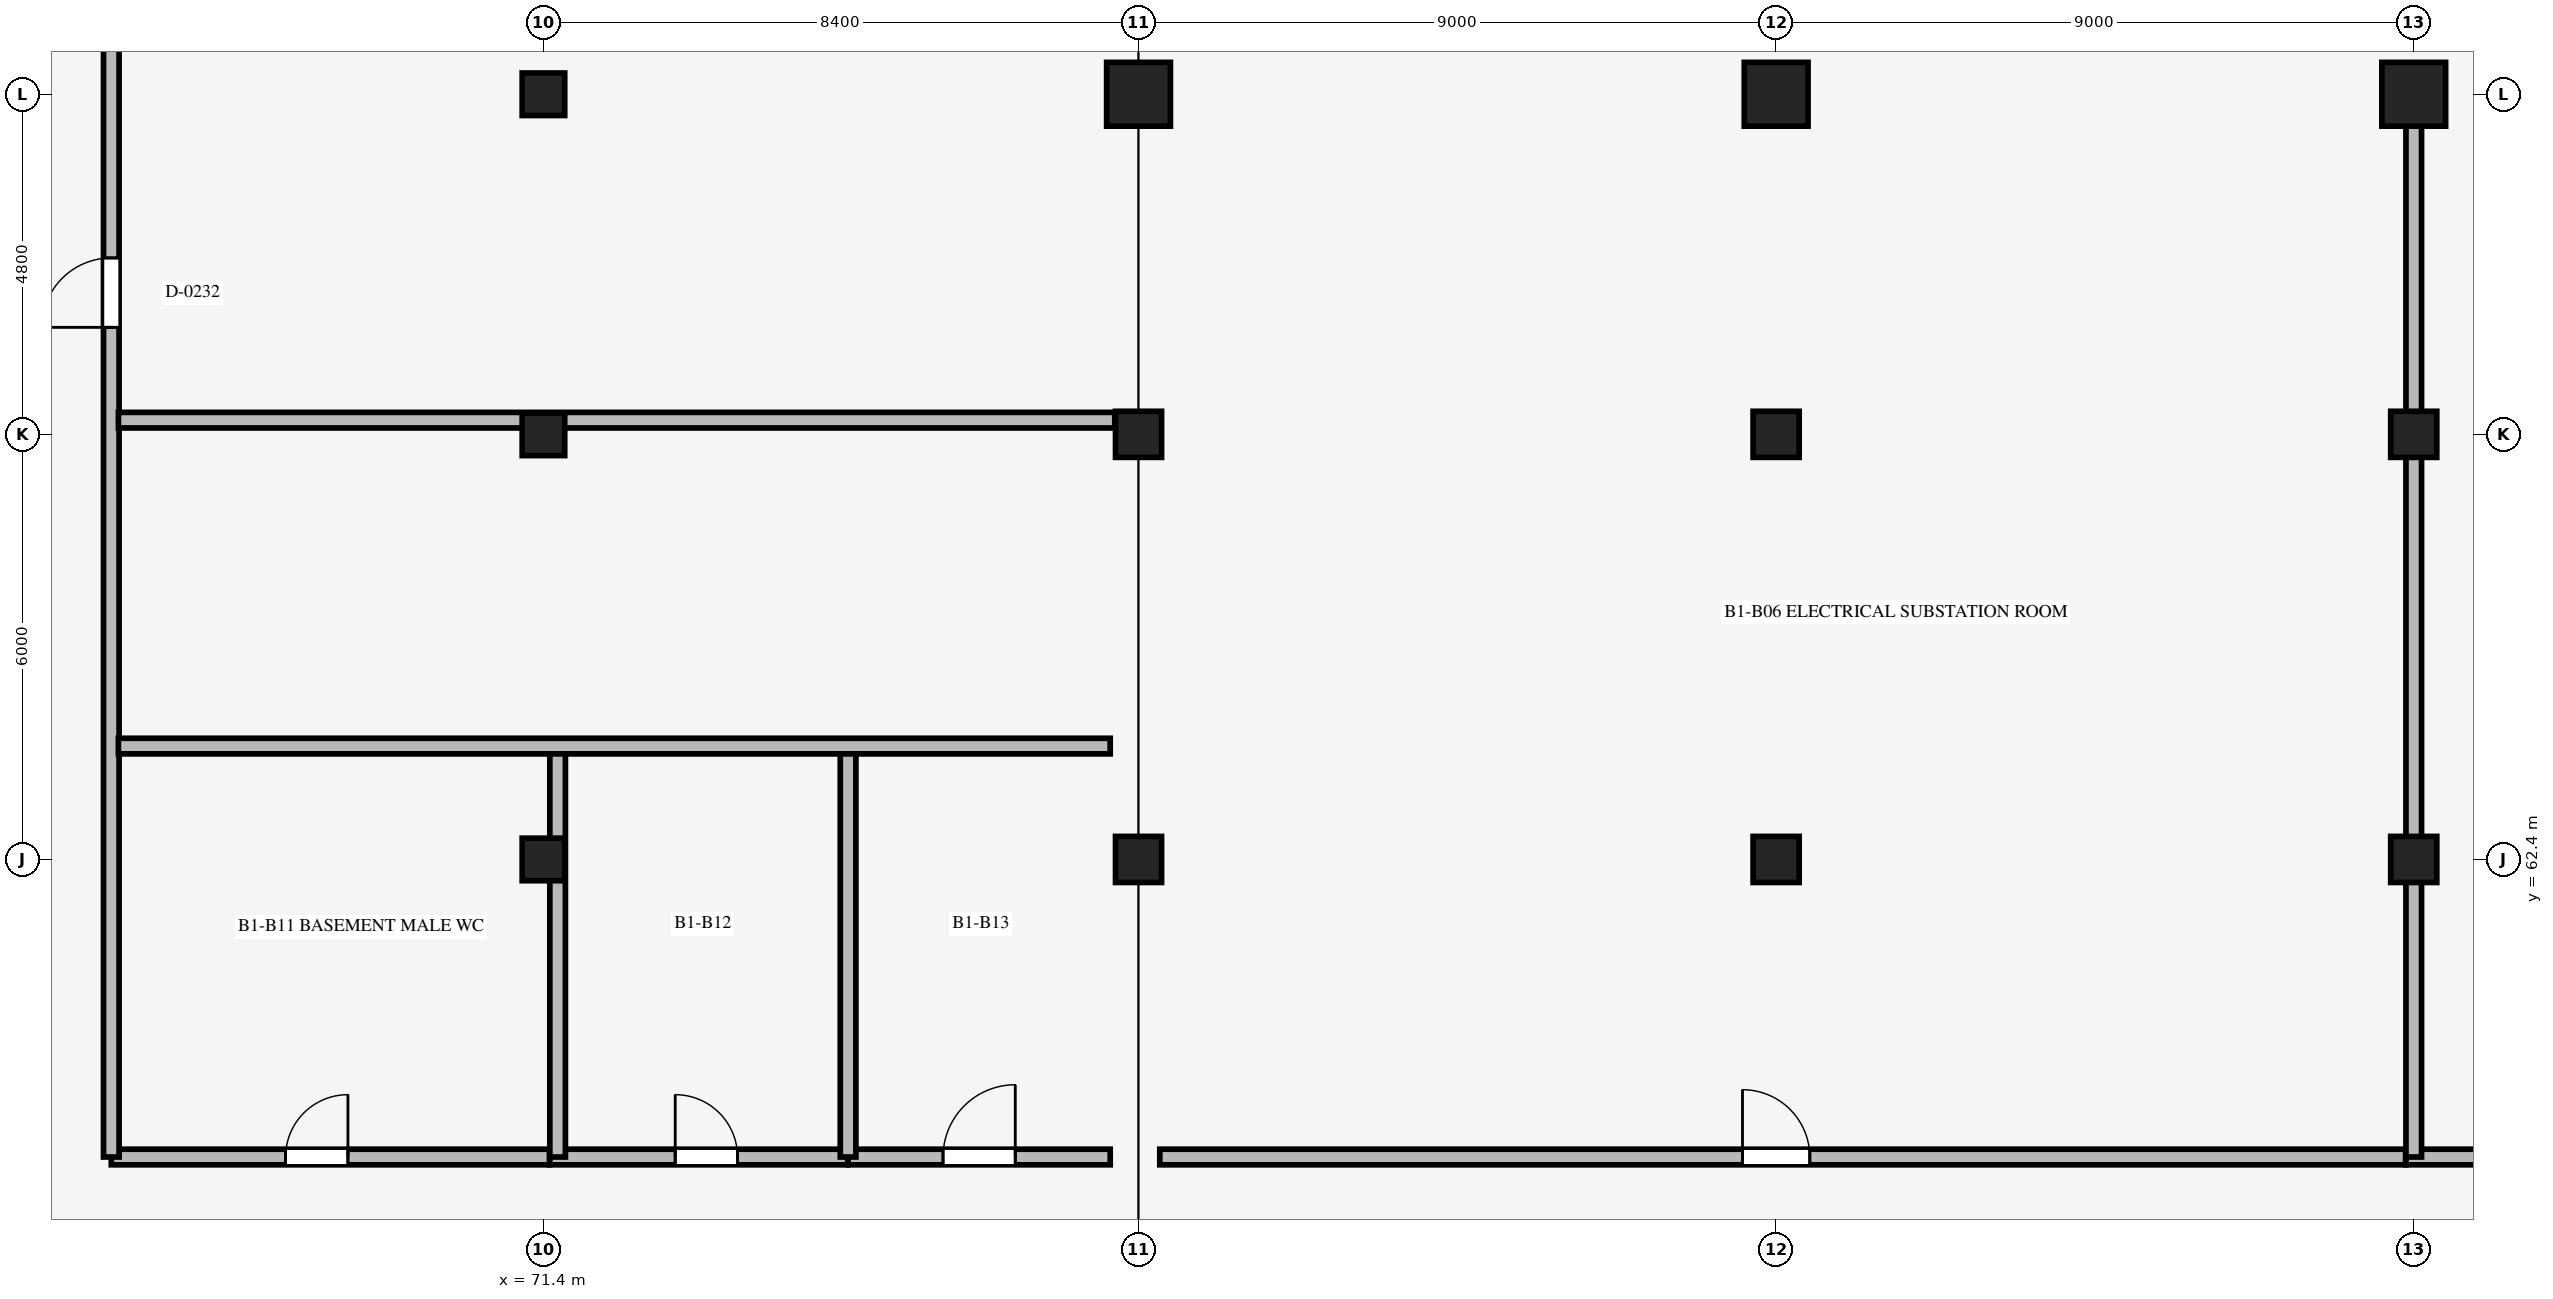
"""IFC4 building model, lengths in metres.
Left out: names, types, materials, properties, quantities, classifications, styles, units other than length and angle.
Written with IfcOpenShell. Run it as: python <this file> out.ifc"""

import sys

from ifc_helpers import new_model, si_unit, direction, frame, frame_2d, origin, origin_2d, place, context, subcontext, project, spatial, rectangle, extrude, element, fill, save


model = new_model("IFC4")
c1 = context("Model", 3, precision=1e-05, world=origin(), true_north=direction((0.0, 1.0)))
c2 = subcontext(c1, "Body", "Model", "MODEL_VIEW")
j1 = project(units=[si_unit("LENGTHUNIT", "METRE"), si_unit("PLANEANGLEUNIT", "RADIAN")], contexts=[c1])
p1 = place(None, origin())
s1 = spatial("IfcSite", under=j1, at=p1, CompositionType="ELEMENT")
p2 = place(p1, origin())
s2 = spatial("IfcBuilding", under=s1, at=p2, CompositionType="ELEMENT")
p3 = place(p2, frame((0.0, 0.0, -4.8)))
s3 = spatial("IfcBuildingStorey", under=s2, at=p3, CompositionType="ELEMENT", Elevation=-4.8)
for number, where, z_axis, x_axis in (
    (1, (71.4, 62.4, 0.0), (0.0, 0.0, 1.0), (1.0, 0.0, 0.0)),
    (2, (71.4, 68.4, 0.0), (0.0, 0.0, 1.0), (1.0, 0.0, 0.0)),
    (3, (71.4, 73.2, 0.0), (0.0, 0.0, 1.0), (1.0, 0.0, 0.0)),
):
    element("IfcColumn", number, at=place(p3, frame(where, z_axis=z_axis, x_axis=x_axis)), inside=s3, PredefinedType="COLUMN", context=c2, shape_type="SweptSolid", body=[
        extrude(rectangle(XDim=0.6, YDim=0.6, at=origin_2d()), origin(), (0.0, 0.0, 1.0), 4.8),
    ])
for number, where, z_axis, x_axis in (
    (4, (79.8, 62.4, 0.0), (0.0, 0.0, 1.0), (1.0, 0.0, 0.0)),
    (5, (79.8, 68.4, 0.0), (0.0, 0.0, 1.0), (1.0, 0.0, 0.0)),
):
    element("IfcColumn", number, at=place(p3, frame(where, z_axis=z_axis, x_axis=x_axis)), inside=s3, PredefinedType="COLUMN", context=c2, shape_type="SweptSolid", body=[
        extrude(rectangle(XDim=0.65, YDim=0.65, at=origin_2d()), origin(), (0.0, 0.0, 1.0), 4.8),
    ])
p4 = place(p3, frame((79.8, 73.2, 0.0), z_axis=(0.0, 0.0, 1.0), x_axis=(1.0, 0.0, 0.0)))
e6 = element("IfcColumn", 6, at=p4, inside=s3, PredefinedType="COLUMN", context=c2, shape_type="SweptSolid", body=[
    extrude(rectangle(XDim=0.9, YDim=0.9, at=origin_2d()), origin(), (0.0, 0.0, 1.0), 4.8),
])
for number, where, z_axis, x_axis in (
    (7, (88.8, 62.4, 0.0), (0.0, 0.0, 1.0), (1.0, 0.0, 0.0)),
    (8, (88.8, 68.4, 0.0), (0.0, 0.0, 1.0), (1.0, 0.0, 0.0)),
):
    element("IfcColumn", number, at=place(p3, frame(where, z_axis=z_axis, x_axis=x_axis)), inside=s3, PredefinedType="COLUMN", context=c2, shape_type="SweptSolid", body=[
        extrude(rectangle(XDim=0.65, YDim=0.65, at=origin_2d()), origin(), (0.0, 0.0, 1.0), 4.8),
    ])
p5 = place(p3, frame((88.8, 73.2, 0.0), z_axis=(0.0, 0.0, 1.0), x_axis=(1.0, 0.0, 0.0)))
e9 = element("IfcColumn", 9, at=p5, inside=s3, PredefinedType="COLUMN", context=c2, shape_type="SweptSolid", body=[
    extrude(rectangle(XDim=0.9, YDim=0.9, at=origin_2d()), origin(), (0.0, 0.0, 1.0), 4.8),
])
for number, where, z_axis, x_axis in (
    (10, (97.8, 62.4, 0.0), (0.0, 0.0, 1.0), (1.0, 0.0, 0.0)),
    (11, (97.8, 68.4, 0.0), (0.0, 0.0, 1.0), (1.0, 0.0, 0.0)),
):
    element("IfcColumn", number, at=place(p3, frame(where, z_axis=z_axis, x_axis=x_axis)), inside=s3, PredefinedType="COLUMN", context=c2, shape_type="SweptSolid", body=[
        extrude(rectangle(XDim=0.65, YDim=0.65, at=origin_2d()), origin(), (0.0, 0.0, 1.0), 4.8),
    ])
p6 = place(p3, frame((97.8, 73.2, 0.0), z_axis=(0.0, 0.0, 1.0), x_axis=(1.0, 0.0, 0.0)))
e12 = element("IfcColumn", 12, at=p6, inside=s3, PredefinedType="COLUMN", context=c2, shape_type="SweptSolid", body=[
    extrude(rectangle(XDim=0.9, YDim=0.9, at=origin_2d()), origin(), (0.0, 0.0, 1.0), 4.8),
])
p7 = place(p3, frame((65.3, 58.2, 0.0), z_axis=(0.0, 0.0, 1.0), x_axis=(1.0, 0.0, 0.0)))
e13 = element("IfcWall", 13, at=p7, inside=s3, PredefinedType="STANDARD", context=c2, shape_type="SweptSolid", body=[
    extrude(rectangle(XDim=6.185, YDim=0.22, at=frame_2d((3.093, 0.0))), origin(), (0.0, 0.0, 1.0), 3.1),
])
p8 = place(p7, frame((2.46, 0.0, 0.0)))
e14 = element("IfcOpeningElement", 14, at=p8, cuts=e13, PredefinedType="OPENING", context=c2, shape_type="SweptSolid", body=[
    extrude(rectangle(XDim=0.88, YDim=2.1, at=frame_2d((0.44, 1.05))), frame((0.0, 0.12, 0.0), z_axis=(0.0, -1.0, 0.0), x_axis=(1.0, 0.0, 0.0)), (0.0, 0.0, 1.0), 0.24),
])
p9 = place(p3, frame((71.49, 58.2, 0.0), z_axis=(0.0, 0.0, 1.0), x_axis=(1.0, 0.0, 0.0)))
e15 = element("IfcWall", 15, at=p9, inside=s3, PredefinedType="STANDARD", context=c2, shape_type="SweptSolid", body=[
    extrude(rectangle(XDim=4.205, YDim=0.22, at=frame_2d((2.103, 0.0))), origin(), (0.0, 0.0, 1.0), 3.1),
])
p10 = place(p9, frame((1.77, 0.0, 0.0)))
e16 = element("IfcOpeningElement", 16, at=p10, cuts=e15, PredefinedType="OPENING", context=c2, shape_type="SweptSolid", body=[
    extrude(rectangle(XDim=0.88, YDim=2.1, at=frame_2d((0.44, 1.05))), frame((0.0, 0.12, 0.0), z_axis=(0.0, -1.0, 0.0), x_axis=(1.0, 0.0, 0.0)), (0.0, 0.0, 1.0), 0.24),
])
p11 = place(p3, frame((75.7, 58.2, 0.0), z_axis=(0.0, 0.0, 1.0), x_axis=(1.0, 0.0, 0.0)))
e17 = element("IfcWall", 17, at=p11, inside=s3, PredefinedType="STANDARD", context=c2, shape_type="SweptSolid", body=[
    extrude(rectangle(XDim=3.7, YDim=0.22, at=frame_2d((1.85, 0.0))), origin(), (0.0, 0.0, 1.0), 3.1),
])
p12 = place(p11, frame((1.34, 0.0, 0.0)))
e18 = element("IfcOpeningElement", 18, at=p12, cuts=e17, PredefinedType="OPENING", context=c2, shape_type="SweptSolid", body=[
    extrude(rectangle(XDim=1.02, YDim=2.15, at=frame_2d((0.51, 1.075))), frame((0.0, 0.12, 0.0), z_axis=(0.0, -1.0, 0.0), x_axis=(1.0, 0.0, 0.0)), (0.0, 0.0, 1.0), 0.24),
])
p13 = place(p3, frame((65.3, 58.2, 0.0), z_axis=(0.0, 0.0, 1.0), x_axis=(0.0, 1.0, 0.0)))
e19 = element("IfcWall", 19, at=p13, inside=s3, PredefinedType="STANDARD", context=c2, shape_type="SweptSolid", body=[
    extrude(rectangle(XDim=21.6, YDim=0.22, at=frame_2d((10.8, 0.0))), origin(), (0.0, 0.0, 1.0), 3.1),
])
p14 = place(p13, frame((11.71, 0.0, 0.0)))
e20 = element("IfcOpeningElement", 20, at=p14, cuts=e19, PredefinedType="OPENING", context=c2, shape_type="SweptSolid", body=[
    extrude(rectangle(XDim=0.98, YDim=2.15, at=frame_2d((0.49, 1.075))), frame((0.0, 0.12, 0.0), z_axis=(0.0, -1.0, 0.0), x_axis=(1.0, 0.0, 0.0)), (0.0, 0.0, 1.0), 0.24),
])
p15 = place(p3, frame((65.4, 68.6, 0.0), z_axis=(0.0, 0.0, 1.0), x_axis=(1.0, 0.0, 0.0)))
e21 = element("IfcWall", 21, at=p15, inside=s3, PredefinedType="STANDARD", context=c2, shape_type="SweptSolid", body=[
    extrude(rectangle(XDim=14.065, YDim=0.22, at=frame_2d((7.033, 0.0))), origin(), (0.0, 0.0, 1.0), 3.1),
])
for number, where, z_axis, x_axis in (
    (22, (71.6, 58.2, 0.0), (0.0, 0.0, 1.0), (0.0, 1.0, 0.0)),
    (23, (75.7, 58.2, 0.0), (0.0, 0.0, 1.0), (0.0, 1.0, 0.0)),
):
    element("IfcWall", number, at=place(p3, frame(where, z_axis=z_axis, x_axis=x_axis)), inside=s3, PredefinedType="STANDARD", context=c2, shape_type="SweptSolid", body=[
        extrude(rectangle(XDim=5.8, YDim=0.22, at=frame_2d((2.9, 0.0))), origin(), (0.0, 0.0, 1.0), 3.1),
    ])
p16 = place(p3, frame((65.4, 64.0, 0.0), z_axis=(0.0, 0.0, 1.0), x_axis=(1.0, 0.0, 0.0)))
e24 = element("IfcWall", 24, at=p16, inside=s3, PredefinedType="STANDARD", context=c2, shape_type="SweptSolid", body=[
    extrude(rectangle(XDim=14.0, YDim=0.22, at=frame_2d((7.0, 0.0))), origin(), (0.0, 0.0, 1.0), 3.1),
])
p17 = place(p3, frame((80.1, 58.2, 0.0), z_axis=(0.0, 0.0, 1.0), x_axis=(1.0, 0.0, 0.0)))
e25 = element("IfcWall", 25, at=p17, inside=s3, PredefinedType="STANDARD", context=c2, shape_type="SweptSolid", body=[
    extrude(rectangle(XDim=17.585, YDim=0.22, at=frame_2d((8.792, 0.0))), origin(), (0.0, 0.0, 1.0), 3.1),
])
p18 = place(p17, frame((8.225, 0.0, 0.0)))
e26 = element("IfcOpeningElement", 26, at=p18, cuts=e25, PredefinedType="OPENING", context=c2, shape_type="SweptSolid", body=[
    extrude(rectangle(XDim=0.95, YDim=2.15, at=frame_2d((0.475, 1.075))), frame((0.0, 0.12, 0.0), z_axis=(0.0, -1.0, 0.0), x_axis=(1.0, 0.0, 0.0)), (0.0, 0.0, 1.0), 0.24),
])
p19 = place(p3, frame((97.69, 58.2, 0.0), z_axis=(0.0, 0.0, 1.0), x_axis=(1.0, 0.0, 0.0)))
e27 = element("IfcWall", 27, at=p19, inside=s3, PredefinedType="STANDARD", context=c2, shape_type="SweptSolid", body=[
    extrude(rectangle(XDim=17.995, YDim=0.22, at=frame_2d((8.998, 0.0))), origin(), (0.0, 0.0, 1.0), 3.1),
])
p20 = place(p19, frame((8.635, 0.0, 0.0)))
e28 = element("IfcOpeningElement", 28, at=p20, cuts=e27, PredefinedType="OPENING", context=c2, shape_type="SweptSolid", body=[
    extrude(rectangle(XDim=0.95, YDim=2.15, at=frame_2d((0.475, 1.075))), frame((0.0, 0.12, 0.0), z_axis=(0.0, -1.0, 0.0), x_axis=(1.0, 0.0, 0.0)), (0.0, 0.0, 1.0), 0.24),
])
p21 = place(p3, frame((97.8, 58.2, 0.0), z_axis=(0.0, 0.0, 1.0), x_axis=(0.0, 1.0, 0.0)))
e29 = element("IfcWall", 29, at=p21, inside=s3, PredefinedType="STANDARD", context=c2, shape_type="SweptSolid", body=[
    extrude(rectangle(XDim=14.7, YDim=0.22, at=frame_2d((7.35, 0.0))), origin(), (0.0, 0.0, 1.0), 3.1),
])
p22 = place(p8, origin())
e30 = element("IfcDoor", 30, at=p22, inside=s3, OperationType="SINGLE_SWING_RIGHT", PredefinedType="DOOR", context=c2, shape_type="SweptSolid", body=[
    extrude(rectangle(XDim=0.88, YDim=2.1, at=frame_2d((0.44, 1.05))), frame((0.0, 0.025, 0.0), z_axis=(0.0, -1.0, 0.0), x_axis=(1.0, 0.0, 0.0)), (0.0, 0.0, 1.0), 0.05),
])
fill(e14, e30)
p23 = place(p10, origin())
e31 = element("IfcDoor", 31, at=p23, inside=s3, OperationType="SINGLE_SWING_LEFT", PredefinedType="DOOR", context=c2, shape_type="SweptSolid", body=[
    extrude(rectangle(XDim=0.88, YDim=2.1, at=frame_2d((0.44, 1.05))), frame((0.0, 0.025, 0.0), z_axis=(0.0, -1.0, 0.0), x_axis=(1.0, 0.0, 0.0)), (0.0, 0.0, 1.0), 0.05),
])
fill(e16, e31)
p24 = place(p12, origin())
e32 = element("IfcDoor", 32, at=p24, inside=s3, OperationType="SINGLE_SWING_RIGHT", PredefinedType="DOOR", context=c2, shape_type="SweptSolid", body=[
    extrude(rectangle(XDim=1.02, YDim=2.15, at=frame_2d((0.51, 1.075))), frame((0.0, 0.025, 0.0), z_axis=(0.0, -1.0, 0.0), x_axis=(1.0, 0.0, 0.0)), (0.0, 0.0, 1.0), 0.05),
])
fill(e18, e32)
p25 = place(p14, origin())
e33 = element("IfcDoor", 33, at=p25, inside=s3, OperationType="SINGLE_SWING_LEFT", PredefinedType="DOOR", context=c2, shape_type="SweptSolid", body=[
    extrude(rectangle(XDim=0.98, YDim=2.15, at=frame_2d((0.49, 1.075))), frame((0.0, 0.025, 0.0), z_axis=(0.0, -1.0, 0.0), x_axis=(1.0, 0.0, 0.0)), (0.0, 0.0, 1.0), 0.05),
])
fill(e20, e33)
p26 = place(p18, origin())
e34 = element("IfcDoor", 34, at=p26, inside=s3, OperationType="SINGLE_SWING_LEFT", PredefinedType="DOOR", context=c2, shape_type="SweptSolid", body=[
    extrude(rectangle(XDim=0.95, YDim=2.15, at=frame_2d((0.475, 1.075))), frame((0.0, 0.025, 0.0), z_axis=(0.0, -1.0, 0.0), x_axis=(1.0, 0.0, 0.0)), (0.0, 0.0, 1.0), 0.05),
])
fill(e26, e34)
save(model, sys.argv[1])
